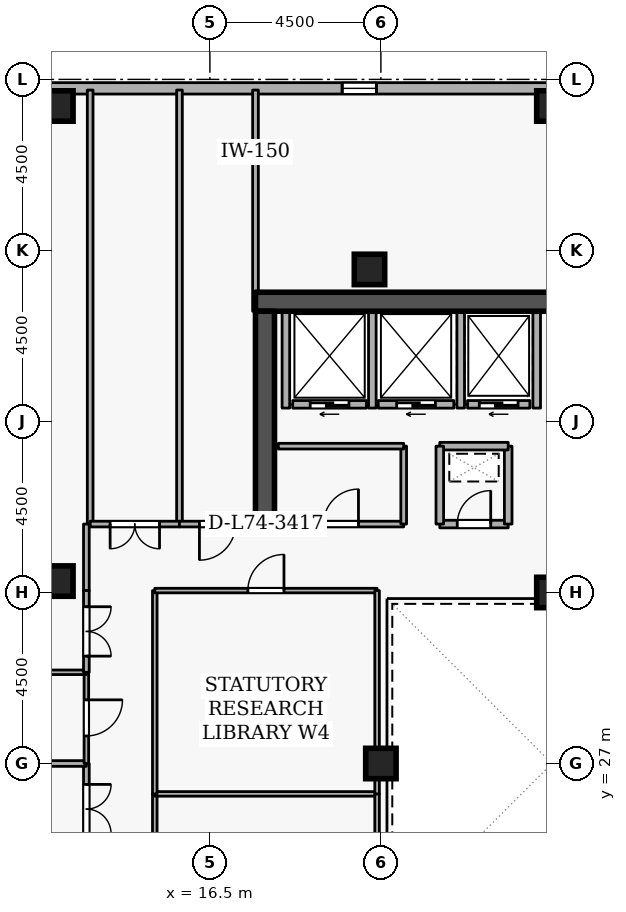
"""IFC4 building model, lengths in metres.
Left out: names, types, materials, properties, quantities, classifications, styles, units other than length and angle.
Written with IfcOpenShell. Run it as: python <this file> out.ifc"""

import sys

from ifc_helpers import new_model, si_unit, direction, frame, frame_2d, origin, origin_2d, place, context, subcontext, project, spatial, rectangle, extrude, element, fill, save


model = new_model("IFC4")
c1 = context("Model", 3, precision=1e-05, world=origin(), true_north=direction((0.0, 1.0)))
c2 = subcontext(c1, "Body", "Model", "MODEL_VIEW")
j1 = project(units=[si_unit("LENGTHUNIT", "METRE"), si_unit("PLANEANGLEUNIT", "RADIAN")], contexts=[c1])
p1 = place(None, origin())
s1 = spatial("IfcSite", under=j1, at=p1, CompositionType="ELEMENT")
p2 = place(p1, origin())
s2 = spatial("IfcBuilding", under=s1, at=p2, CompositionType="ELEMENT")
p3 = place(p2, frame((0.0, 0.0, 276.3)))
s3 = spatial("IfcBuildingStorey", under=s2, at=p3, CompositionType="ELEMENT", Elevation=276.3)
p4 = place(p3, frame((17.7, 39.15, 0.0), z_axis=(0.0, 0.0, 1.0), x_axis=(1.0, 0.0, 0.0)))
e1 = element("IfcWall", 1, at=p4, inside=s3, PredefinedType="SHEAR", context=c2, shape_type="SweptSolid", body=[
    extrude(rectangle(XDim=15.6, YDim=0.5, at=frame_2d((7.8, 0.0))), origin(), (0.0, 0.0, 1.0), 3.6),
])
p5 = place(p3, frame((17.95, 33.1, 0.0), z_axis=(0.0, 0.0, 1.0), x_axis=(0.0, 1.0, 0.0)))
e2 = element("IfcWall", 2, at=p5, inside=s3, PredefinedType="SHEAR", context=c2, shape_type="SweptSolid", body=[
    extrude(rectangle(XDim=5.8, YDim=0.5, at=frame_2d((2.9, 0.0))), origin(), (0.0, 0.0, 1.0), 3.6),
])
for number, where, z_axis, x_axis in (
    (3, (12.5, 44.3, 0.0), (0.0, 0.0, 1.0), (1.0, 0.0, 0.0)),
    (4, (25.5, 44.3, 0.0), (0.0, 0.0, 1.0), (1.0, 0.0, 0.0)),
    (5, (12.5, 31.8, 0.0), (0.0, 0.0, 1.0), (1.0, 0.0, 0.0)),
    (6, (20.7, 40.0, 0.0), (0.0, 0.0, 1.0), (1.0, 0.0, 0.0)),
    (7, (25.5, 31.5, 0.0), (0.0, 0.0, 1.0), (1.0, 0.0, 0.0)),
    (8, (21.0, 27.0, 0.0), (0.0, 0.0, 1.0), (1.0, 0.0, 0.0)),
):
    element("IfcColumn", number, at=place(p3, frame(where, z_axis=z_axis, x_axis=x_axis)), inside=s3, PredefinedType="COLUMN", context=c2, shape_type="SweptSolid", body=[
        extrude(rectangle(XDim=0.8, YDim=0.8, at=origin_2d()), origin(), (0.0, 0.0, 1.0), 3.6),
    ])
p6 = place(p3, frame((46.681, 44.765, 0.0), z_axis=(0.0, 0.0, 1.0), x_axis=(-1.0, 0.0, 0.0)))
e9 = element("IfcWall", 9, at=p6, inside=s3, PredefinedType="STANDARD", context=c2, shape_type="SweptSolid", body=[
    extrude(rectangle(XDim=36.363, YDim=0.3, at=frame_2d((18.181, 0.0))), origin(), (0.0, 0.0, 1.0), 2.66),
])
p7 = place(p6, frame((1.8, 0.0, 0.72)))
e10 = element("IfcOpeningElement", 10, at=p7, cuts=e9, PredefinedType="OPENING", context=c2, shape_type="SweptSolid", body=[
    extrude(rectangle(XDim=0.9, YDim=1.75, at=frame_2d((0.45, 0.875))), frame((0.0, 0.16, 0.0), z_axis=(0.0, -1.0, 0.0), x_axis=(1.0, 0.0, 0.0)), (0.0, 0.0, 1.0), 0.32),
])
p8 = place(p6, frame((11.4, 0.0, 0.72)))
e11 = element("IfcOpeningElement", 11, at=p8, cuts=e9, PredefinedType="OPENING", context=c2, shape_type="SweptSolid", body=[
    extrude(rectangle(XDim=0.9, YDim=1.75, at=frame_2d((0.45, 0.875))), frame((0.0, 0.16, 0.0), z_axis=(0.0, -1.0, 0.0), x_axis=(1.0, 0.0, 0.0)), (0.0, 0.0, 1.0), 0.32),
])
p9 = place(p6, frame((16.2, 0.0, 0.72)))
e12 = element("IfcOpeningElement", 12, at=p9, cuts=e9, PredefinedType="OPENING", context=c2, shape_type="SweptSolid", body=[
    extrude(rectangle(XDim=0.9, YDim=1.75, at=frame_2d((0.45, 0.875))), frame((0.0, 0.16, 0.0), z_axis=(0.0, -1.0, 0.0), x_axis=(1.0, 0.0, 0.0)), (0.0, 0.0, 1.0), 0.32),
])
p10 = place(p6, frame((25.8, 0.0, 0.72)))
e13 = element("IfcOpeningElement", 13, at=p10, cuts=e9, PredefinedType="OPENING", context=c2, shape_type="SweptSolid", body=[
    extrude(rectangle(XDim=0.9, YDim=1.75, at=frame_2d((0.45, 0.875))), frame((0.0, 0.16, 0.0), z_axis=(0.0, -1.0, 0.0), x_axis=(1.0, 0.0, 0.0)), (0.0, 0.0, 1.0), 0.32),
])
p11 = place(p3, frame((24.92, 36.45, 0.0), z_axis=(0.0, 0.0, 1.0), x_axis=(-1.0, 0.0, 0.0)))
e14 = element("IfcWall", 14, at=p11, inside=s3, PredefinedType="STANDARD", context=c2, shape_type="SweptSolid", body=[
    extrude(rectangle(XDim=1.64, YDim=0.2, at=frame_2d((0.82, 0.0))), origin(), (0.0, 0.0, 1.0), 3.26),
])
p12 = place(p11, frame((0.31, 0.0, 0.0)))
e15 = element("IfcOpeningElement", 15, at=p12, cuts=e14, PredefinedType="OPENING", context=c2, shape_type="SweptSolid", body=[
    extrude(rectangle(XDim=1.02, YDim=2.06, at=frame_2d((0.51, 1.03))), frame((0.0, 0.11, 0.0), z_axis=(0.0, -1.0, 0.0), x_axis=(1.0, 0.0, 0.0)), (0.0, 0.0, 1.0), 0.22),
])
p13 = place(p3, frame((22.92, 36.45, 0.0), z_axis=(0.0, 0.0, 1.0), x_axis=(-1.0, 0.0, 0.0)))
e16 = element("IfcWall", 16, at=p13, inside=s3, PredefinedType="STANDARD", context=c2, shape_type="SweptSolid", body=[
    extrude(rectangle(XDim=1.99, YDim=0.2, at=frame_2d((0.995, 0.0))), origin(), (0.0, 0.0, 1.0), 3.26),
])
p14 = place(p13, frame((0.485, 0.0, 0.0)))
e17 = element("IfcOpeningElement", 17, at=p14, cuts=e16, PredefinedType="OPENING", context=c2, shape_type="SweptSolid", body=[
    extrude(rectangle(XDim=1.02, YDim=2.06, at=frame_2d((0.51, 1.03))), frame((0.0, 0.11, 0.0), z_axis=(0.0, -1.0, 0.0), x_axis=(1.0, 0.0, 0.0)), (0.0, 0.0, 1.0), 0.22),
])
p15 = place(p3, frame((20.62, 36.45, 0.0), z_axis=(0.0, 0.0, 1.0), x_axis=(-1.0, 0.0, 0.0)))
e18 = element("IfcWall", 18, at=p15, inside=s3, PredefinedType="STANDARD", context=c2, shape_type="SweptSolid", body=[
    extrude(rectangle(XDim=1.94, YDim=0.2, at=frame_2d((0.97, 0.0))), origin(), (0.0, 0.0, 1.0), 3.26),
])
p16 = place(p15, frame((0.46, 0.0, 0.0)))
e19 = element("IfcOpeningElement", 19, at=p16, cuts=e18, PredefinedType="OPENING", context=c2, shape_type="SweptSolid", body=[
    extrude(rectangle(XDim=1.02, YDim=2.06, at=frame_2d((0.51, 1.03))), frame((0.0, 0.11, 0.0), z_axis=(0.0, -1.0, 0.0), x_axis=(1.0, 0.0, 0.0)), (0.0, 0.0, 1.0), 0.22),
])
for number, where, z_axis, x_axis in (
    (20, (25.1, 36.352, 0.0), (0.0, 0.0, 1.0), (0.0, 1.0, 0.0)),
    (21, (23.1, 36.352, 0.0), (0.0, 0.0, 1.0), (0.0, 1.0, 0.0)),
    (22, (20.775, 36.352, 0.0), (0.0, 0.0, 1.0), (0.0, 1.0, 0.0)),
    (23, (18.5, 36.352, 0.0), (0.0, 0.0, 1.0), (0.0, 1.0, 0.0)),
):
    element("IfcWall", number, at=place(p3, frame(where, z_axis=z_axis, x_axis=x_axis)), inside=s3, PredefinedType="STANDARD", context=c2, shape_type="SweptSolid", body=[
        extrude(rectangle(XDim=2.536, YDim=0.2, at=frame_2d((1.268, 0.0))), origin(), (0.0, 0.0, 1.0), 3.26),
    ])
p17 = place(p3, frame((22.55, 33.3, 0.0), z_axis=(0.0, 0.0, 1.0), x_axis=(1.0, 0.0, 0.0)))
e24 = element("IfcWall", 24, at=p17, inside=s3, PredefinedType="STANDARD", context=c2, shape_type="SweptSolid", body=[
    extrude(rectangle(XDim=1.8, YDim=0.2, at=frame_2d((0.9, 0.0))), origin(), (0.0, 0.0, 1.0), 3.26),
])
p18 = place(p17, frame((0.46, 0.0, 0.0)))
e25 = element("IfcOpeningElement", 25, at=p18, cuts=e24, PredefinedType="OPENING", context=c2, shape_type="SweptSolid", body=[
    extrude(rectangle(XDim=0.88, YDim=2.04, at=frame_2d((0.44, 1.02))), frame((0.0, 0.11, 0.0), z_axis=(0.0, -1.0, 0.0), x_axis=(1.0, 0.0, 0.0)), (0.0, 0.0, 1.0), 0.22),
])
p19 = place(p3, frame((24.35, 33.3, 0.0), z_axis=(0.0, 0.0, 1.0), x_axis=(0.0, 1.0, 0.0)))
e26 = element("IfcWall", 26, at=p19, inside=s3, PredefinedType="STANDARD", context=c2, shape_type="SweptSolid", body=[
    extrude(rectangle(XDim=2.05, YDim=0.2, at=frame_2d((1.025, 0.0))), origin(), (0.0, 0.0, 1.0), 3.26),
])
p20 = place(p3, frame((24.35, 35.35, 0.0), z_axis=(0.0, 0.0, 1.0), x_axis=(-1.0, 0.0, 0.0)))
e27 = element("IfcWall", 27, at=p20, inside=s3, PredefinedType="STANDARD", context=c2, shape_type="SweptSolid", body=[
    extrude(rectangle(XDim=1.8, YDim=0.2, at=frame_2d((0.9, 0.0))), origin(), (0.0, 0.0, 1.0), 3.26),
])
p21 = place(p3, frame((22.55, 35.35, 0.0), z_axis=(0.0, 0.0, 1.0), x_axis=(0.0, -1.0, 0.0)))
e28 = element("IfcWall", 28, at=p21, inside=s3, PredefinedType="STANDARD", context=c2, shape_type="SweptSolid", body=[
    extrude(rectangle(XDim=2.05, YDim=0.2, at=frame_2d((1.025, 0.0))), origin(), (0.0, 0.0, 1.0), 3.26),
])
p22 = place(p3, frame((18.3, 33.3, 0.0), z_axis=(0.0, 0.0, 1.0), x_axis=(1.0, 0.0, 0.0)))
e29 = element("IfcWall", 29, at=p22, inside=s3, PredefinedType="PARTITIONING", context=c2, shape_type="SweptSolid", body=[
    extrude(rectangle(XDim=3.3, YDim=0.15, at=frame_2d((1.65, 0.0))), origin(), (0.0, 0.0, 1.0), 3.26),
])
p23 = place(p22, frame((1.19, 0.0, 0.0)))
e30 = element("IfcOpeningElement", 30, at=p23, cuts=e29, PredefinedType="OPENING", context=c2, shape_type="SweptSolid", body=[
    extrude(rectangle(XDim=0.92, YDim=2.08, at=frame_2d((0.46, 1.04))), frame((0.0, 0.085, 0.0), z_axis=(0.0, -1.0, 0.0), x_axis=(1.0, 0.0, 0.0)), (0.0, 0.0, 1.0), 0.17),
])
p24 = place(p3, frame((21.6, 33.3, 0.0), z_axis=(0.0, 0.0, 1.0), x_axis=(0.0, 1.0, 0.0)))
e31 = element("IfcWall", 31, at=p24, inside=s3, PredefinedType="PARTITIONING", context=c2, shape_type="SweptSolid", body=[
    extrude(rectangle(XDim=2.05, YDim=0.15, at=frame_2d((1.025, 0.0))), origin(), (0.0, 0.0, 1.0), 3.26),
])
p25 = place(p3, frame((21.6, 35.35, 0.0), z_axis=(0.0, 0.0, 1.0), x_axis=(-1.0, 0.0, 0.0)))
e32 = element("IfcWall", 32, at=p25, inside=s3, PredefinedType="PARTITIONING", context=c2, shape_type="SweptSolid", body=[
    extrude(rectangle(XDim=3.3, YDim=0.15, at=frame_2d((1.65, 0.0))), origin(), (0.0, 0.0, 1.0), 3.26),
])
for number, where, z_axis, x_axis in (
    (33, (13.35, 33.3, 0.0), (0.0, 0.0, 1.0), (0.0, 1.0, 0.0)),
    (34, (15.7, 44.72, 0.0), (0.0, 0.0, 1.0), (0.0, -1.0, 0.0)),
):
    element("IfcWall", number, at=place(p3, frame(where, z_axis=z_axis, x_axis=x_axis)), inside=s3, PredefinedType="PARTITIONING", context=c2, shape_type="SweptSolid", body=[
        extrude(rectangle(XDim=11.42, YDim=0.15, at=frame_2d((5.71, 0.0))), origin(), (0.0, 0.0, 1.0), 3.26),
    ])
p26 = place(p3, frame((15.7, 33.3, 0.0), z_axis=(0.0, 0.0, 1.0), x_axis=(-1.0, 0.0, 0.0)))
e35 = element("IfcWall", 35, at=p26, inside=s3, PredefinedType="PARTITIONING", context=c2, shape_type="SweptSolid", body=[
    extrude(rectangle(XDim=2.35, YDim=0.15, at=frame_2d((1.175, 0.0))), origin(), (0.0, 0.0, 1.0), 3.26),
])
p27 = place(p26, frame((0.525, 0.0, 0.0)))
e36 = element("IfcOpeningElement", 36, at=p27, cuts=e35, PredefinedType="OPENING", context=c2, shape_type="SweptSolid", body=[
    extrude(rectangle(XDim=1.3, YDim=2.12, at=frame_2d((0.65, 1.06))), frame((0.0, 0.085, 0.0), z_axis=(0.0, -1.0, 0.0), x_axis=(1.0, 0.0, 0.0)), (0.0, 0.0, 1.0), 0.17),
])
p28 = place(p3, frame((17.7, 44.72, 0.0), z_axis=(0.0, 0.0, 1.0), x_axis=(0.0, -1.0, 0.0)))
e37 = element("IfcWall", 37, at=p28, inside=s3, PredefinedType="PARTITIONING", context=c2, shape_type="SweptSolid", body=[
    extrude(rectangle(XDim=5.82, YDim=0.15, at=frame_2d((2.91, 0.0))), origin(), (0.0, 0.0, 1.0), 2.465),
])
p29 = place(p3, frame((17.7, 33.3, 0.0), z_axis=(0.0, 0.0, 1.0), x_axis=(-1.0, 0.0, 0.0)))
e38 = element("IfcWall", 38, at=p29, inside=s3, PredefinedType="PARTITIONING", context=c2, shape_type="SweptSolid", body=[
    extrude(rectangle(XDim=2.0, YDim=0.15, at=frame_2d((1.0, 0.0))), origin(), (0.0, 0.0, 1.0), 3.26),
])
p30 = place(p29, frame((0.525, 0.0, 0.0)))
e39 = element("IfcOpeningElement", 39, at=p30, cuts=e38, PredefinedType="OPENING", context=c2, shape_type="SweptSolid", body=[
    extrude(rectangle(XDim=0.95, YDim=2.1, at=frame_2d((0.475, 1.05))), frame((0.0, 0.085, 0.0), z_axis=(0.0, -1.0, 0.0), x_axis=(1.0, 0.0, 0.0)), (0.0, 0.0, 1.0), 0.17),
])
p31 = place(p3, frame((13.25, 27.0, 0.0), z_axis=(0.0, 0.0, 1.0), x_axis=(0.0, -1.0, 0.0)))
e40 = element("IfcWall", 40, at=p31, inside=s3, PredefinedType="PARTITIONING", context=c2, shape_type="SweptSolid", body=[
    extrude(rectangle(XDim=2.4, YDim=0.15, at=frame_2d((1.2, 0.0))), origin(), (0.0, 0.0, 1.0), 3.26),
])
p32 = place(p31, frame((0.55, 0.0, 0.0)))
e41 = element("IfcOpeningElement", 41, at=p32, cuts=e40, PredefinedType="OPENING", context=c2, shape_type="SweptSolid", body=[
    extrude(rectangle(XDim=1.3, YDim=2.12, at=frame_2d((0.65, 1.06))), frame((0.0, 0.085, 0.0), z_axis=(0.0, -1.0, 0.0), x_axis=(1.0, 0.0, 0.0)), (0.0, 0.0, 1.0), 0.17),
])
p33 = place(p3, frame((7.78, 27.0, 0.0), z_axis=(0.0, 0.0, 1.0), x_axis=(1.0, 0.0, 0.0)))
e42 = element("IfcWall", 42, at=p33, inside=s3, PredefinedType="PARTITIONING", context=c2, shape_type="SweptSolid", body=[
    extrude(rectangle(XDim=5.47, YDim=0.15, at=frame_2d((2.735, 0.0))), origin(), (0.0, 0.0, 1.0), 2.802),
])
p34 = place(p3, frame((13.25, 29.4, 0.0), z_axis=(0.0, 0.0, 1.0), x_axis=(0.0, -1.0, 0.0)))
e43 = element("IfcWall", 43, at=p34, inside=s3, PredefinedType="PARTITIONING", context=c2, shape_type="SweptSolid", body=[
    extrude(rectangle(XDim=2.4, YDim=0.12, at=frame_2d((1.2, 0.0))), origin(), (0.0, 0.0, 1.0), 3.26),
])
p35 = place(p34, frame((0.725, 0.0, 0.0)))
e44 = element("IfcOpeningElement", 44, at=p35, cuts=e43, PredefinedType="OPENING", context=c2, shape_type="SweptSolid", body=[
    extrude(rectangle(XDim=0.95, YDim=2.1, at=frame_2d((0.475, 1.05))), frame((0.0, 0.07, 0.0), z_axis=(0.0, -1.0, 0.0), x_axis=(1.0, 0.0, 0.0)), (0.0, 0.0, 1.0), 0.14),
])
p36 = place(p3, frame((7.78, 29.4, 0.0), z_axis=(0.0, 0.0, 1.0), x_axis=(1.0, 0.0, 0.0)))
e45 = element("IfcWall", 45, at=p36, inside=s3, PredefinedType="PARTITIONING", context=c2, shape_type="SweptSolid", body=[
    extrude(rectangle(XDim=5.47, YDim=0.12, at=frame_2d((2.735, 0.0))), origin(), (0.0, 0.0, 1.0), 3.26),
])
p37 = place(p3, frame((13.25, 33.3, 0.0), z_axis=(0.0, 0.0, 1.0), x_axis=(0.0, -1.0, 0.0)))
e46 = element("IfcWall", 46, at=p37, inside=s3, PredefinedType="PARTITIONING", context=c2, shape_type="SweptSolid", body=[
    extrude(rectangle(XDim=1.75, YDim=0.15, at=frame_2d((0.875, 0.0))), origin(), (0.0, 0.0, 1.0), 3.26),
])
p38 = place(p3, frame((13.25, 31.55, 0.0), z_axis=(0.0, 0.0, 1.0), x_axis=(0.0, -1.0, 0.0)))
e47 = element("IfcWall", 47, at=p38, inside=s3, PredefinedType="PARTITIONING", context=c2, shape_type="SweptSolid", body=[
    extrude(rectangle(XDim=2.15, YDim=0.15, at=frame_2d((1.075, 0.0))), origin(), (0.0, 0.0, 1.0), 3.26),
])
p39 = place(p38, frame((0.425, 0.0, 0.0)))
e48 = element("IfcOpeningElement", 48, at=p39, cuts=e47, PredefinedType="OPENING", context=c2, shape_type="SweptSolid", body=[
    extrude(rectangle(XDim=1.3, YDim=2.12, at=frame_2d((0.65, 1.06))), frame((0.0, 0.085, 0.0), z_axis=(0.0, -1.0, 0.0), x_axis=(1.0, 0.0, 0.0)), (0.0, 0.0, 1.0), 0.17),
])
p40 = place(p3, frame((15.05, 22.45, 0.0), z_axis=(0.0, 0.0, 1.0), x_axis=(0.0, 1.0, 0.0)))
e49 = element("IfcWall", 49, at=p40, inside=s3, PredefinedType="PARTITIONING", context=c2, shape_type="SweptSolid", body=[
    extrude(rectangle(XDim=3.75, YDim=0.12, at=frame_2d((1.875, 0.0))), origin(), (0.0, 0.0, 1.0), 3.26),
])
p41 = place(p3, frame((15.05, 26.2, 0.0), z_axis=(0.0, 0.0, 1.0), x_axis=(1.0, 0.0, 0.0)))
e50 = element("IfcWall", 50, at=p41, inside=s3, PredefinedType="PARTITIONING", context=c2, shape_type="SweptSolid", body=[
    extrude(rectangle(XDim=5.85, YDim=0.12, at=frame_2d((2.925, 0.0))), origin(), (0.0, 0.0, 1.0), 3.26),
])
p42 = place(p3, frame((20.9, 26.2, 0.0), z_axis=(0.0, 0.0, 1.0), x_axis=(0.0, -1.0, 0.0)))
e51 = element("IfcWall", 51, at=p42, inside=s3, PredefinedType="PARTITIONING", context=c2, shape_type="SweptSolid", body=[
    extrude(rectangle(XDim=3.75, YDim=0.12, at=frame_2d((1.875, 0.0))), origin(), (0.0, 0.0, 1.0), 3.26),
])
p43 = place(p3, frame((15.05, 26.2, 0.0), z_axis=(0.0, 0.0, 1.0), x_axis=(0.0, 1.0, 0.0)))
e52 = element("IfcWall", 52, at=p43, inside=s3, PredefinedType="PARTITIONING", context=c2, shape_type="SweptSolid", body=[
    extrude(rectangle(XDim=5.35, YDim=0.12, at=frame_2d((2.675, 0.0))), origin(), (0.0, 0.0, 1.0), 3.26),
])
p44 = place(p3, frame((15.05, 31.55, 0.0), z_axis=(0.0, 0.0, 1.0), x_axis=(1.0, 0.0, 0.0)))
e53 = element("IfcWall", 53, at=p44, inside=s3, PredefinedType="PARTITIONING", context=c2, shape_type="SweptSolid", body=[
    extrude(rectangle(XDim=5.85, YDim=0.12, at=frame_2d((2.925, 0.0))), origin(), (0.0, 0.0, 1.0), 3.26),
])
p45 = place(p44, frame((2.45, 0.0, 0.0)))
e54 = element("IfcOpeningElement", 54, at=p45, cuts=e53, PredefinedType="OPENING", context=c2, shape_type="SweptSolid", body=[
    extrude(rectangle(XDim=0.95, YDim=2.1, at=frame_2d((0.475, 1.05))), frame((0.0, 0.07, 0.0), z_axis=(0.0, -1.0, 0.0), x_axis=(1.0, 0.0, 0.0)), (0.0, 0.0, 1.0), 0.14),
])
p46 = place(p3, frame((20.9, 31.55, 0.0), z_axis=(0.0, 0.0, 1.0), x_axis=(0.0, -1.0, 0.0)))
e55 = element("IfcWall", 55, at=p46, inside=s3, PredefinedType="PARTITIONING", context=c2, shape_type="SweptSolid", body=[
    extrude(rectangle(XDim=5.35, YDim=0.12, at=frame_2d((2.675, 0.0))), origin(), (0.0, 0.0, 1.0), 3.26),
])
p47 = place(p10, origin())
e56 = element("IfcWindow", 56, at=p47, inside=s3, PartitioningType="SINGLE_PANEL", PredefinedType="WINDOW", context=c2, shape_type="SweptSolid", body=[
    extrude(rectangle(XDim=0.9, YDim=1.75, at=frame_2d((0.45, 0.875))), frame((0.0, 0.03, 0.0), z_axis=(0.0, -1.0, 0.0), x_axis=(1.0, 0.0, 0.0)), (0.0, 0.0, 1.0), 0.06),
])
fill(e13, e56)
p48 = place(p12, origin())
e57 = element("IfcDoor", 57, at=p48, inside=s3, OperationType="SLIDING_TO_LEFT", PredefinedType="DOOR", context=c2, shape_type="SweptSolid", body=[
    extrude(rectangle(XDim=1.02, YDim=2.06, at=frame_2d((0.51, 1.03))), frame((0.0, 0.025, 0.0), z_axis=(0.0, -1.0, 0.0), x_axis=(1.0, 0.0, 0.0)), (0.0, 0.0, 1.0), 0.05),
])
fill(e15, e57)
p49 = place(p14, origin())
e58 = element("IfcDoor", 58, at=p49, inside=s3, OperationType="SLIDING_TO_LEFT", PredefinedType="DOOR", context=c2, shape_type="SweptSolid", body=[
    extrude(rectangle(XDim=1.02, YDim=2.06, at=frame_2d((0.51, 1.03))), frame((0.0, 0.025, 0.0), z_axis=(0.0, -1.0, 0.0), x_axis=(1.0, 0.0, 0.0)), (0.0, 0.0, 1.0), 0.05),
])
fill(e17, e58)
p50 = place(p16, origin())
e59 = element("IfcDoor", 59, at=p50, inside=s3, OperationType="SLIDING_TO_LEFT", PredefinedType="DOOR", context=c2, shape_type="SweptSolid", body=[
    extrude(rectangle(XDim=1.02, YDim=2.06, at=frame_2d((0.51, 1.03))), frame((0.0, 0.025, 0.0), z_axis=(0.0, -1.0, 0.0), x_axis=(1.0, 0.0, 0.0)), (0.0, 0.0, 1.0), 0.05),
])
fill(e19, e59)
p51 = place(p18, origin())
e60 = element("IfcDoor", 60, at=p51, inside=s3, OperationType="SINGLE_SWING_RIGHT", PredefinedType="DOOR", context=c2, shape_type="SweptSolid", body=[
    extrude(rectangle(XDim=0.88, YDim=2.04, at=frame_2d((0.44, 1.02))), frame((0.0, 0.025, 0.0), z_axis=(0.0, -1.0, 0.0), x_axis=(1.0, 0.0, 0.0)), (0.0, 0.0, 1.0), 0.05),
])
fill(e25, e60)
p52 = place(p23, origin())
e61 = element("IfcDoor", 61, at=p52, inside=s3, OperationType="SINGLE_SWING_RIGHT", PredefinedType="DOOR", context=c2, shape_type="SweptSolid", body=[
    extrude(rectangle(XDim=0.92, YDim=2.08, at=frame_2d((0.46, 1.04))), frame((0.0, 0.025, 0.0), z_axis=(0.0, -1.0, 0.0), x_axis=(1.0, 0.0, 0.0)), (0.0, 0.0, 1.0), 0.05),
])
fill(e30, e61)
p53 = place(p27, origin())
e62 = element("IfcDoor", 62, at=p53, inside=s3, OperationType="DOUBLE_DOOR_SINGLE_SWING", PredefinedType="DOOR", context=c2, shape_type="SweptSolid", body=[
    extrude(rectangle(XDim=1.3, YDim=2.12, at=frame_2d((0.65, 1.06))), frame((0.0, 0.025, 0.0), z_axis=(0.0, -1.0, 0.0), x_axis=(1.0, 0.0, 0.0)), (0.0, 0.0, 1.0), 0.05),
])
fill(e36, e62)
p54 = place(p30, origin())
e63 = element("IfcDoor", 63, at=p54, inside=s3, OperationType="SINGLE_SWING_RIGHT", PredefinedType="DOOR", context=c2, shape_type="SweptSolid", body=[
    extrude(rectangle(XDim=0.95, YDim=2.1, at=frame_2d((0.475, 1.05))), frame((0.0, 0.025, 0.0), z_axis=(0.0, -1.0, 0.0), x_axis=(1.0, 0.0, 0.0)), (0.0, 0.0, 1.0), 0.05),
])
fill(e39, e63)
p55 = place(p32, origin())
e64 = element("IfcDoor", 64, at=p55, inside=s3, OperationType="DOUBLE_DOOR_SINGLE_SWING", PredefinedType="DOOR", context=c2, shape_type="SweptSolid", body=[
    extrude(rectangle(XDim=1.3, YDim=2.12, at=frame_2d((0.65, 1.06))), frame((0.0, 0.025, 0.0), z_axis=(0.0, -1.0, 0.0), x_axis=(1.0, 0.0, 0.0)), (0.0, 0.0, 1.0), 0.05),
])
fill(e41, e64)
p56 = place(p35, origin())
e65 = element("IfcDoor", 65, at=p56, inside=s3, OperationType="SINGLE_SWING_LEFT", PredefinedType="DOOR", context=c2, shape_type="SweptSolid", body=[
    extrude(rectangle(XDim=0.95, YDim=2.1, at=frame_2d((0.475, 1.05))), frame((0.0, 0.025, 0.0), z_axis=(0.0, -1.0, 0.0), x_axis=(1.0, 0.0, 0.0)), (0.0, 0.0, 1.0), 0.05),
])
fill(e44, e65)
p57 = place(p39, origin())
e66 = element("IfcDoor", 66, at=p57, inside=s3, OperationType="DOUBLE_DOOR_SINGLE_SWING", PredefinedType="DOOR", context=c2, shape_type="SweptSolid", body=[
    extrude(rectangle(XDim=1.3, YDim=2.12, at=frame_2d((0.65, 1.06))), frame((0.0, 0.025, 0.0), z_axis=(0.0, -1.0, 0.0), x_axis=(1.0, 0.0, 0.0)), (0.0, 0.0, 1.0), 0.05),
])
fill(e48, e66)
p58 = place(p45, origin())
e67 = element("IfcDoor", 67, at=p58, inside=s3, OperationType="SINGLE_SWING_RIGHT", PredefinedType="DOOR", context=c2, shape_type="SweptSolid", body=[
    extrude(rectangle(XDim=0.95, YDim=2.1, at=frame_2d((0.475, 1.05))), frame((0.0, 0.025, 0.0), z_axis=(0.0, -1.0, 0.0), x_axis=(1.0, 0.0, 0.0)), (0.0, 0.0, 1.0), 0.05),
])
fill(e54, e67)
save(model, sys.argv[1])
